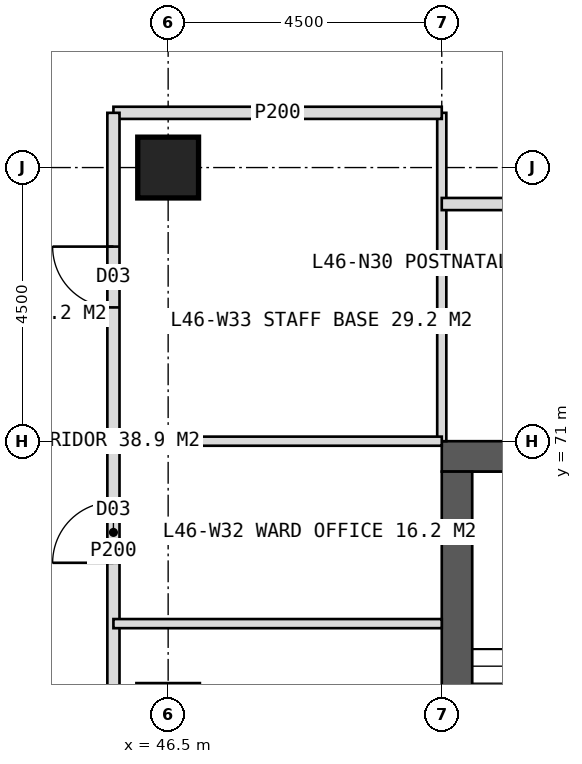
"""IFC4 building model, lengths in metres.
Left out: names, types, materials, properties, quantities, classifications, styles, units other than length and angle.
Written with IfcOpenShell. Run it as: python <this file> out.ifc"""

import sys

from ifc_helpers import new_model, si_unit, direction, frame, frame_2d, origin, origin_2d, place, context, subcontext, project, spatial, rectangle, hollow_rectangle, extrude, element, fill, save


model = new_model("IFC4")
c1 = context("Model", 3, precision=1e-05, world=origin(), true_north=direction((0.0, 1.0)))
c2 = subcontext(c1, "Body", "Model", "MODEL_VIEW")
j1 = project(units=[si_unit("LENGTHUNIT", "METRE"), si_unit("PLANEANGLEUNIT", "RADIAN")], contexts=[c1])
p1 = place(None, origin())
s1 = spatial("IfcSite", under=j1, at=p1, CompositionType="ELEMENT")
p2 = place(p1, origin())
s2 = spatial("IfcBuilding", under=s1, at=p2, CompositionType="ELEMENT")
p3 = place(p2, frame((0.0, 0.0, 193.0)))
s3 = spatial("IfcBuildingStorey", under=s2, at=p3, CompositionType="ELEMENT", Elevation=193.0)
p4 = place(p3, frame((51.0, 70.75, 0.0), z_axis=(0.0, 0.0, 1.0), x_axis=(1.0, 0.0, 0.0)))
e1 = element("IfcWall", 1, at=p4, inside=s3, PredefinedType="SHEAR", context=c2, shape_type="SweptSolid", body=[
    extrude(rectangle(XDim=18.0, YDim=0.5, at=frame_2d((9.0, 0.0))), origin(), (0.0, 0.0, 1.0), 4.0),
])
p5 = place(p4, frame((8.1, 0.0, 0.0)))
e2 = element("IfcOpeningElement", 2, at=p5, cuts=e1, PredefinedType="OPENING", context=c2, shape_type="SweptSolid", body=[
    extrude(rectangle(XDim=1.8, YDim=2.2, at=frame_2d((0.9, 1.1))), frame((0.0, 0.26, 0.0), z_axis=(0.0, -1.0, 0.0), x_axis=(1.0, 0.0, 0.0)), (0.0, 0.0, 1.0), 0.52),
])
p6 = place(p3, frame((51.25, 53.5, 0.0), z_axis=(0.0, 0.0, 1.0), x_axis=(0.0, 1.0, 0.0)))
e3 = element("IfcWall", 3, at=p6, inside=s3, PredefinedType="SHEAR", context=c2, shape_type="SweptSolid", body=[
    extrude(rectangle(XDim=17.0, YDim=0.5, at=frame_2d((8.5, 0.0))), origin(), (0.0, 0.0, 1.0), 4.0),
])
p7 = place(p6, frame((6.1, 0.0, 0.0)))
e4 = element("IfcOpeningElement", 4, at=p7, cuts=e3, PredefinedType="OPENING", context=c2, shape_type="SweptSolid", body=[
    extrude(rectangle(XDim=1.5, YDim=2.2, at=frame_2d((0.75, 1.1))), frame((0.0, 0.26, 0.0), z_axis=(0.0, -1.0, 0.0), x_axis=(1.0, 0.0, 0.0)), (0.0, 0.0, 1.0), 0.52),
])
p8 = place(p3, frame((46.5, 75.5, 0.0), z_axis=(0.0, 0.0, 1.0), x_axis=(1.0, 0.0, 0.0)))
e5 = element("IfcColumn", 5, at=p8, inside=s3, PredefinedType="COLUMN", context=c2, shape_type="SweptSolid", body=[
    extrude(hollow_rectangle(XDim=1.0, YDim=1.0, WallThickness=0.1, at=origin_2d()), origin(), (0.0, 0.0, 1.0), 4.0),
])
p9 = place(p3, frame((51.0, 71.0, 0.0), z_axis=(0.0, 0.0, 1.0), x_axis=(0.0, 1.0, 0.0)))
e6 = element("IfcWall", 6, at=p9, inside=s3, PredefinedType="PARTITIONING", context=c2, shape_type="SweptSolid", body=[
    extrude(rectangle(XDim=5.4, YDim=0.15, at=frame_2d((2.7, 0.0))), origin(), (0.0, 0.0, 1.0), 3.75),
])
p10 = place(p3, frame((45.6, 76.4, 0.0), z_axis=(0.0, 0.0, 1.0), x_axis=(1.0, 0.0, 0.0)))
e7 = element("IfcWall", 7, at=p10, inside=s3, PredefinedType="PARTITIONING", context=c2, shape_type="SweptSolid", body=[
    extrude(rectangle(XDim=5.4, YDim=0.2, at=frame_2d((2.7, 0.0))), origin(), (0.0, 0.0, 1.0), 3.75),
])
p11 = place(p3, frame((51.0, 74.9, 0.0), z_axis=(0.0, 0.0, 1.0), x_axis=(1.0, 0.0, 0.0)))
e8 = element("IfcWall", 8, at=p11, inside=s3, PredefinedType="PARTITIONING", context=c2, shape_type="SweptSolid", body=[
    extrude(rectangle(XDim=6.75, YDim=0.2, at=frame_2d((3.375, 0.0))), origin(), (0.0, 0.0, 1.0), 3.75),
])
p12 = place(p11, frame((1.45, 0.0, 0.0)))
e9 = element("IfcOpeningElement", 9, at=p12, cuts=e8, PredefinedType="OPENING", context=c2, shape_type="SweptSolid", body=[
    extrude(rectangle(XDim=1.0, YDim=2.1, at=frame_2d((0.5, 1.05))), frame((0.0, 0.11, 0.0), z_axis=(0.0, -1.0, 0.0), x_axis=(1.0, 0.0, 0.0)), (0.0, 0.0, 1.0), 0.22),
])
p13 = place(p3, frame((45.6, 62.0, 0.0), z_axis=(0.0, 0.0, 1.0), x_axis=(0.0, 1.0, 0.0)))
e10 = element("IfcWall", 10, at=p13, inside=s3, PredefinedType="PARTITIONING", context=c2, shape_type="SweptSolid", body=[
    extrude(rectangle(XDim=14.4, YDim=0.2, at=frame_2d((7.2, 0.0))), origin(), (0.0, 0.0, 1.0), 3.75),
])
p14 = place(p13, frame((2.5, 0.0, 0.0)))
e11 = element("IfcOpeningElement", 11, at=p14, cuts=e10, PredefinedType="OPENING", context=c2, shape_type="SweptSolid", body=[
    extrude(rectangle(XDim=1.0, YDim=2.1, at=frame_2d((0.5, 1.05))), frame((0.0, 0.11, 0.0), z_axis=(0.0, -1.0, 0.0), x_axis=(1.0, 0.0, 0.0)), (0.0, 0.0, 1.0), 0.22),
])
p15 = place(p13, frame((7.0, 0.0, 0.0)))
e12 = element("IfcOpeningElement", 12, at=p15, cuts=e10, PredefinedType="OPENING", context=c2, shape_type="SweptSolid", body=[
    extrude(rectangle(XDim=1.0, YDim=2.1, at=frame_2d((0.5, 1.05))), frame((0.0, 0.11, 0.0), z_axis=(0.0, -1.0, 0.0), x_axis=(1.0, 0.0, 0.0)), (0.0, 0.0, 1.0), 0.22),
])
p16 = place(p13, frame((11.2, 0.0, 0.0)))
e13 = element("IfcOpeningElement", 13, at=p16, cuts=e10, PredefinedType="OPENING", context=c2, shape_type="SweptSolid", body=[
    extrude(rectangle(XDim=1.0, YDim=2.1, at=frame_2d((0.5, 1.05))), frame((0.0, 0.11, 0.0), z_axis=(0.0, -1.0, 0.0), x_axis=(1.0, 0.0, 0.0)), (0.0, 0.0, 1.0), 0.22),
])
for number, where, z_axis, x_axis in (
    (14, (51.0, 68.0, 0.0), (0.0, 0.0, 1.0), (-1.0, 0.0, 0.0)),
    (15, (51.0, 71.0, 0.0), (0.0, 0.0, 1.0), (-1.0, 0.0, 0.0)),
):
    element("IfcWall", number, at=place(p3, frame(where, z_axis=z_axis, x_axis=x_axis)), inside=s3, PredefinedType="PARTITIONING", context=c2, shape_type="SweptSolid", body=[
        extrude(rectangle(XDim=5.4, YDim=0.15, at=frame_2d((2.7, 0.0))), origin(), (0.0, 0.0, 1.0), 3.75),
    ])
p17 = place(p15, origin())
e16 = element("IfcDoor", 16, at=p17, inside=s3, OperationType="SINGLE_SWING_LEFT", PredefinedType="DOOR", context=c2, shape_type="SweptSolid", body=[
    extrude(rectangle(XDim=1.0, YDim=2.1, at=frame_2d((0.5, 1.05))), frame((0.0, 0.025, 0.0), z_axis=(0.0, -1.0, 0.0), x_axis=(1.0, 0.0, 0.0)), (0.0, 0.0, 1.0), 0.05),
])
fill(e12, e16)
p18 = place(p16, origin())
e17 = element("IfcDoor", 17, at=p18, inside=s3, OperationType="SINGLE_SWING_RIGHT", PredefinedType="DOOR", context=c2, shape_type="SweptSolid", body=[
    extrude(rectangle(XDim=1.0, YDim=2.1, at=frame_2d((0.5, 1.05))), frame((0.0, 0.025, 0.0), z_axis=(0.0, -1.0, 0.0), x_axis=(1.0, 0.0, 0.0)), (0.0, 0.0, 1.0), 0.05),
])
fill(e13, e17)
save(model, sys.argv[1])
